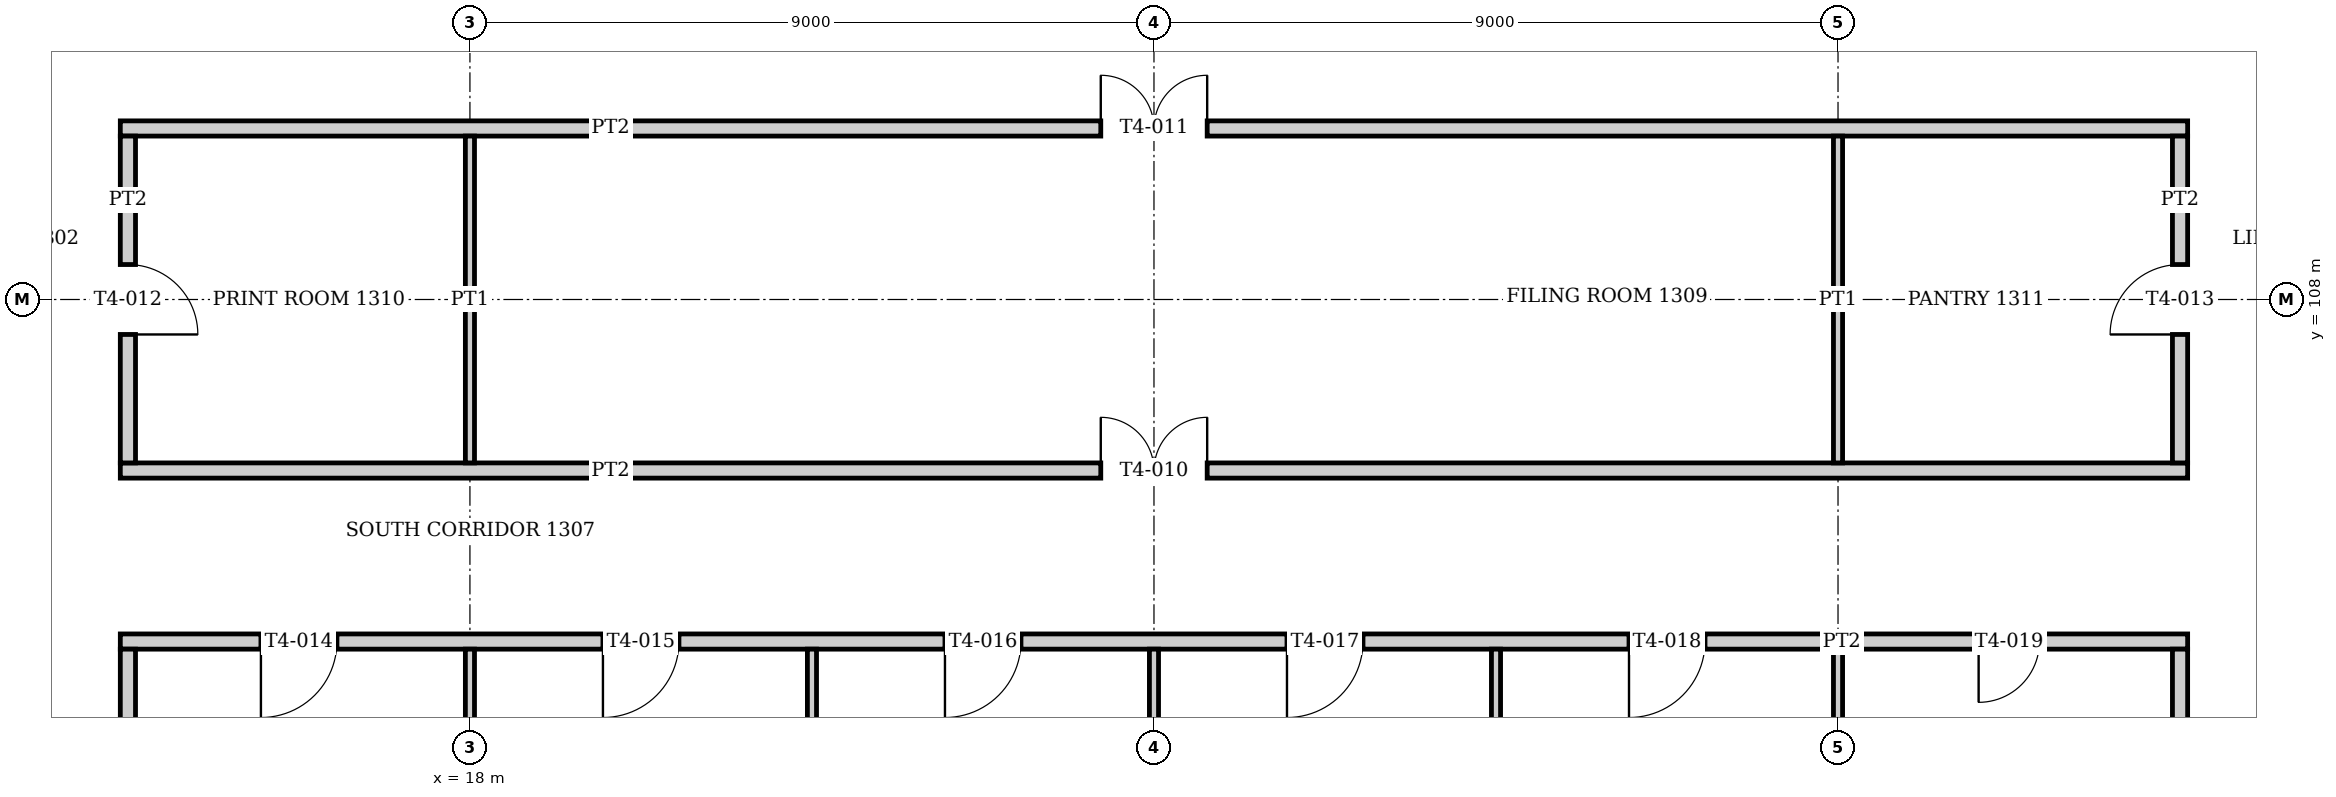
"""IFC4 building model, lengths in metres.
Left out: names, types, materials, properties, quantities, classifications, styles, units other than length and angle.
Written with IfcOpenShell. Run it as: python <this file> out.ifc"""

import sys

from ifc_helpers import new_model, si_unit, direction, frame, frame_2d, origin, place, context, subcontext, project, spatial, rectangle, extrude, element, fill, save


model = new_model("IFC4")
c1 = context("Model", 3, precision=1e-05, world=origin(), true_north=direction((0.0, 1.0)))
c2 = subcontext(c1, "Body", "Model", "MODEL_VIEW")
j1 = project(units=[si_unit("LENGTHUNIT", "METRE"), si_unit("PLANEANGLEUNIT", "RADIAN")], contexts=[c1])
p1 = place(None, origin())
s1 = spatial("IfcSite", under=j1, at=p1, CompositionType="ELEMENT")
p2 = place(p1, origin())
s2 = spatial("IfcBuilding", under=s1, at=p2, CompositionType="ELEMENT")
p3 = place(p2, frame((0.0, 0.0, 55.2)))
s3 = spatial("IfcBuildingStorey", under=s2, at=p3, CompositionType="ELEMENT", Elevation=55.2)
p4 = place(p3, frame((13.4, 103.5, 0.0), z_axis=(0.0, 0.0, 1.0), x_axis=(1.0, 0.0, 0.0)))
e1 = element("IfcWall", 1, at=p4, inside=s3, PredefinedType="PARTITIONING", context=c2, shape_type="SweptSolid", body=[
    extrude(rectangle(XDim=27.2, YDim=0.2, at=frame_2d((13.6, 0.0))), origin(), (0.0, 0.0, 1.0), 3.05),
])
p5 = place(p4, frame((1.85, 0.0, 0.0)))
e2 = element("IfcOpeningElement", 2, at=p5, cuts=e1, PredefinedType="OPENING", context=c2, shape_type="SweptSolid", body=[
    extrude(rectangle(XDim=1.0, YDim=2.1, at=frame_2d((0.5, 1.05))), frame((0.0, 0.11, 0.0), z_axis=(0.0, -1.0, 0.0), x_axis=(1.0, 0.0, 0.0)), (0.0, 0.0, 1.0), 0.22),
])
p6 = place(p4, frame((6.35, 0.0, 0.0)))
e3 = element("IfcOpeningElement", 3, at=p6, cuts=e1, PredefinedType="OPENING", context=c2, shape_type="SweptSolid", body=[
    extrude(rectangle(XDim=1.0, YDim=2.1, at=frame_2d((0.5, 1.05))), frame((0.0, 0.11, 0.0), z_axis=(0.0, -1.0, 0.0), x_axis=(1.0, 0.0, 0.0)), (0.0, 0.0, 1.0), 0.22),
])
p7 = place(p4, frame((10.85, 0.0, 0.0)))
e4 = element("IfcOpeningElement", 4, at=p7, cuts=e1, PredefinedType="OPENING", context=c2, shape_type="SweptSolid", body=[
    extrude(rectangle(XDim=1.0, YDim=2.1, at=frame_2d((0.5, 1.05))), frame((0.0, 0.11, 0.0), z_axis=(0.0, -1.0, 0.0), x_axis=(1.0, 0.0, 0.0)), (0.0, 0.0, 1.0), 0.22),
])
p8 = place(p4, frame((15.35, 0.0, 0.0)))
e5 = element("IfcOpeningElement", 5, at=p8, cuts=e1, PredefinedType="OPENING", context=c2, shape_type="SweptSolid", body=[
    extrude(rectangle(XDim=1.0, YDim=2.1, at=frame_2d((0.5, 1.05))), frame((0.0, 0.11, 0.0), z_axis=(0.0, -1.0, 0.0), x_axis=(1.0, 0.0, 0.0)), (0.0, 0.0, 1.0), 0.22),
])
p9 = place(p4, frame((19.85, 0.0, 0.0)))
e6 = element("IfcOpeningElement", 6, at=p9, cuts=e1, PredefinedType="OPENING", context=c2, shape_type="SweptSolid", body=[
    extrude(rectangle(XDim=1.0, YDim=2.1, at=frame_2d((0.5, 1.05))), frame((0.0, 0.11, 0.0), z_axis=(0.0, -1.0, 0.0), x_axis=(1.0, 0.0, 0.0)), (0.0, 0.0, 1.0), 0.22),
])
p10 = place(p4, frame((24.45, 0.0, 0.0)))
e7 = element("IfcOpeningElement", 7, at=p10, cuts=e1, PredefinedType="OPENING", context=c2, shape_type="SweptSolid", body=[
    extrude(rectangle(XDim=0.8, YDim=2.1, at=frame_2d((0.4, 1.05))), frame((0.0, 0.11, 0.0), z_axis=(0.0, -1.0, 0.0), x_axis=(1.0, 0.0, 0.0)), (0.0, 0.0, 1.0), 0.22),
])
p11 = place(p3, frame((13.4, 105.75, 0.0), z_axis=(0.0, 0.0, 1.0), x_axis=(1.0, 0.0, 0.0)))
e8 = element("IfcWall", 8, at=p11, inside=s3, PredefinedType="PARTITIONING", context=c2, shape_type="SweptSolid", body=[
    extrude(rectangle(XDim=27.2, YDim=0.2, at=frame_2d((13.6, 0.0))), origin(), (0.0, 0.0, 1.0), 3.05),
])
p12 = place(p11, frame((12.9, 0.0, 0.0)))
e9 = element("IfcOpeningElement", 9, at=p12, cuts=e8, PredefinedType="OPENING", context=c2, shape_type="SweptSolid", body=[
    extrude(rectangle(XDim=1.4, YDim=2.1, at=frame_2d((0.7, 1.05))), frame((0.0, 0.11, 0.0), z_axis=(0.0, -1.0, 0.0), x_axis=(1.0, 0.0, 0.0)), (0.0, 0.0, 1.0), 0.22),
])
p13 = place(p3, frame((13.4, 110.25, 0.0), z_axis=(0.0, 0.0, 1.0), x_axis=(1.0, 0.0, 0.0)))
e10 = element("IfcWall", 10, at=p13, inside=s3, PredefinedType="PARTITIONING", context=c2, shape_type="SweptSolid", body=[
    extrude(rectangle(XDim=27.2, YDim=0.2, at=frame_2d((13.6, 0.0))), origin(), (0.0, 0.0, 1.0), 3.05),
])
p14 = place(p13, frame((12.9, 0.0, 0.0)))
e11 = element("IfcOpeningElement", 11, at=p14, cuts=e10, PredefinedType="OPENING", context=c2, shape_type="SweptSolid", body=[
    extrude(rectangle(XDim=1.4, YDim=2.1, at=frame_2d((0.7, 1.05))), frame((0.0, 0.11, 0.0), z_axis=(0.0, -1.0, 0.0), x_axis=(1.0, 0.0, 0.0)), (0.0, 0.0, 1.0), 0.22),
])
p15 = place(p3, frame((13.5, 99.075, 0.0), z_axis=(0.0, 0.0, 1.0), x_axis=(0.0, 1.0, 0.0)))
e12 = element("IfcWall", 12, at=p15, inside=s3, PredefinedType="PARTITIONING", context=c2, shape_type="SweptSolid", body=[
    extrude(rectangle(XDim=4.325, YDim=0.2, at=frame_2d((2.163, 0.0))), origin(), (0.0, 0.0, 1.0), 3.05),
])
p16 = place(p3, frame((13.5, 105.85, 0.0), z_axis=(0.0, 0.0, 1.0), x_axis=(0.0, 1.0, 0.0)))
e13 = element("IfcWall", 13, at=p16, inside=s3, PredefinedType="PARTITIONING", context=c2, shape_type="SweptSolid", body=[
    extrude(rectangle(XDim=4.3, YDim=0.2, at=frame_2d((2.15, 0.0))), origin(), (0.0, 0.0, 1.0), 3.05),
])
p17 = place(p16, frame((1.69, 0.0, 0.0)))
e14 = element("IfcOpeningElement", 14, at=p17, cuts=e13, PredefinedType="OPENING", context=c2, shape_type="SweptSolid", body=[
    extrude(rectangle(XDim=0.92, YDim=2.1, at=frame_2d((0.46, 1.05))), frame((0.0, 0.11, 0.0), z_axis=(0.0, -1.0, 0.0), x_axis=(1.0, 0.0, 0.0)), (0.0, 0.0, 1.0), 0.22),
])
p18 = place(p3, frame((18.0, 99.164, 0.0), z_axis=(0.0, 0.0, 1.0), x_axis=(0.0, 1.0, 0.0)))
e15 = element("IfcWall", 15, at=p18, inside=s3, PredefinedType="PARTITIONING", context=c2, shape_type="SweptSolid", body=[
    extrude(rectangle(XDim=4.236, YDim=0.12, at=frame_2d((2.118, 0.0))), origin(), (0.0, 0.0, 1.0), 3.05),
])
p19 = place(p3, frame((18.0, 105.85, 0.0), z_axis=(0.0, 0.0, 1.0), x_axis=(0.0, 1.0, 0.0)))
e16 = element("IfcWall", 16, at=p19, inside=s3, PredefinedType="PARTITIONING", context=c2, shape_type="SweptSolid", body=[
    extrude(rectangle(XDim=4.3, YDim=0.12, at=frame_2d((2.15, 0.0))), origin(), (0.0, 0.0, 1.0), 3.05),
])
p20 = place(p3, frame((22.5, 99.075, 0.0), z_axis=(0.0, 0.0, 1.0), x_axis=(0.0, 1.0, 0.0)))
e17 = element("IfcWall", 17, at=p20, inside=s3, PredefinedType="PARTITIONING", context=c2, shape_type="SweptSolid", body=[
    extrude(rectangle(XDim=4.325, YDim=0.12, at=frame_2d((2.163, 0.0))), origin(), (0.0, 0.0, 1.0), 3.05),
])
p21 = place(p3, frame((27.0, 99.164, 0.0), z_axis=(0.0, 0.0, 1.0), x_axis=(0.0, 1.0, 0.0)))
e18 = element("IfcWall", 18, at=p21, inside=s3, PredefinedType="PARTITIONING", context=c2, shape_type="SweptSolid", body=[
    extrude(rectangle(XDim=4.236, YDim=0.12, at=frame_2d((2.118, 0.0))), origin(), (0.0, 0.0, 1.0), 3.05),
])
p22 = place(p3, frame((31.5, 99.075, 0.0), z_axis=(0.0, 0.0, 1.0), x_axis=(0.0, 1.0, 0.0)))
e19 = element("IfcWall", 19, at=p22, inside=s3, PredefinedType="PARTITIONING", context=c2, shape_type="SweptSolid", body=[
    extrude(rectangle(XDim=4.325, YDim=0.12, at=frame_2d((2.163, 0.0))), origin(), (0.0, 0.0, 1.0), 3.05),
])
p23 = place(p3, frame((36.0, 99.164, 0.0), z_axis=(0.0, 0.0, 1.0), x_axis=(0.0, 1.0, 0.0)))
e20 = element("IfcWall", 20, at=p23, inside=s3, PredefinedType="PARTITIONING", context=c2, shape_type="SweptSolid", body=[
    extrude(rectangle(XDim=4.236, YDim=0.12, at=frame_2d((2.118, 0.0))), origin(), (0.0, 0.0, 1.0), 3.05),
])
p24 = place(p3, frame((36.0, 105.85, 0.0), z_axis=(0.0, 0.0, 1.0), x_axis=(0.0, 1.0, 0.0)))
e21 = element("IfcWall", 21, at=p24, inside=s3, PredefinedType="PARTITIONING", context=c2, shape_type="SweptSolid", body=[
    extrude(rectangle(XDim=4.3, YDim=0.12, at=frame_2d((2.15, 0.0))), origin(), (0.0, 0.0, 1.0), 3.05),
])
p25 = place(p3, frame((40.5, 99.075, 0.0), z_axis=(0.0, 0.0, 1.0), x_axis=(0.0, 1.0, 0.0)))
e22 = element("IfcWall", 22, at=p25, inside=s3, PredefinedType="PARTITIONING", context=c2, shape_type="SweptSolid", body=[
    extrude(rectangle(XDim=4.325, YDim=0.2, at=frame_2d((2.163, 0.0))), origin(), (0.0, 0.0, 1.0), 3.05),
])
p26 = place(p3, frame((40.5, 105.85, 0.0), z_axis=(0.0, 0.0, 1.0), x_axis=(0.0, 1.0, 0.0)))
e23 = element("IfcWall", 23, at=p26, inside=s3, PredefinedType="PARTITIONING", context=c2, shape_type="SweptSolid", body=[
    extrude(rectangle(XDim=4.3, YDim=0.2, at=frame_2d((2.15, 0.0))), origin(), (0.0, 0.0, 1.0), 3.05),
])
p27 = place(p26, frame((1.69, 0.0, 0.0)))
e24 = element("IfcOpeningElement", 24, at=p27, cuts=e23, PredefinedType="OPENING", context=c2, shape_type="SweptSolid", body=[
    extrude(rectangle(XDim=0.92, YDim=2.1, at=frame_2d((0.46, 1.05))), frame((0.0, 0.11, 0.0), z_axis=(0.0, -1.0, 0.0), x_axis=(1.0, 0.0, 0.0)), (0.0, 0.0, 1.0), 0.22),
])
p28 = place(p12, origin())
e25 = element("IfcDoor", 25, at=p28, inside=s3, OperationType="DOUBLE_DOOR_SINGLE_SWING", PredefinedType="DOOR", context=c2, shape_type="SweptSolid", body=[
    extrude(rectangle(XDim=1.4, YDim=2.1, at=frame_2d((0.7, 1.05))), frame((0.0, 0.025, 0.0), z_axis=(0.0, -1.0, 0.0), x_axis=(1.0, 0.0, 0.0)), (0.0, 0.0, 1.0), 0.05),
])
fill(e9, e25)
p29 = place(p14, origin())
e26 = element("IfcDoor", 26, at=p29, inside=s3, OperationType="DOUBLE_DOOR_SINGLE_SWING", PredefinedType="DOOR", context=c2, shape_type="SweptSolid", body=[
    extrude(rectangle(XDim=1.4, YDim=2.1, at=frame_2d((0.7, 1.05))), frame((0.0, 0.025, 0.0), z_axis=(0.0, -1.0, 0.0), x_axis=(1.0, 0.0, 0.0)), (0.0, 0.0, 1.0), 0.05),
])
fill(e11, e26)
p30 = place(p17, frame((0.92, 0.0, 0.0), z_axis=(0.0, 0.0, 1.0), x_axis=(-1.0, 0.0, 0.0)))
e27 = element("IfcDoor", 27, at=p30, inside=s3, OperationType="SINGLE_SWING_RIGHT", PredefinedType="DOOR", context=c2, shape_type="SweptSolid", body=[
    extrude(rectangle(XDim=0.92, YDim=2.1, at=frame_2d((0.46, 1.05))), frame((0.0, 0.025, 0.0), z_axis=(0.0, -1.0, 0.0), x_axis=(1.0, 0.0, 0.0)), (0.0, 0.0, 1.0), 0.05),
])
fill(e14, e27)
p31 = place(p27, origin())
e28 = element("IfcDoor", 28, at=p31, inside=s3, OperationType="SINGLE_SWING_LEFT", PredefinedType="DOOR", context=c2, shape_type="SweptSolid", body=[
    extrude(rectangle(XDim=0.92, YDim=2.1, at=frame_2d((0.46, 1.05))), frame((0.0, 0.025, 0.0), z_axis=(0.0, -1.0, 0.0), x_axis=(1.0, 0.0, 0.0)), (0.0, 0.0, 1.0), 0.05),
])
fill(e24, e28)
p32 = place(p5, frame((1.0, 0.0, 0.0), z_axis=(0.0, 0.0, 1.0), x_axis=(-1.0, 0.0, 0.0)))
e29 = element("IfcDoor", 29, at=p32, inside=s3, OperationType="SINGLE_SWING_RIGHT", PredefinedType="DOOR", context=c2, shape_type="SweptSolid", body=[
    extrude(rectangle(XDim=1.0, YDim=2.1, at=frame_2d((0.5, 1.05))), frame((0.0, 0.025, 0.0), z_axis=(0.0, -1.0, 0.0), x_axis=(1.0, 0.0, 0.0)), (0.0, 0.0, 1.0), 0.05),
])
fill(e2, e29)
p33 = place(p6, frame((1.0, 0.0, 0.0), z_axis=(0.0, 0.0, 1.0), x_axis=(-1.0, 0.0, 0.0)))
e30 = element("IfcDoor", 30, at=p33, inside=s3, OperationType="SINGLE_SWING_RIGHT", PredefinedType="DOOR", context=c2, shape_type="SweptSolid", body=[
    extrude(rectangle(XDim=1.0, YDim=2.1, at=frame_2d((0.5, 1.05))), frame((0.0, 0.025, 0.0), z_axis=(0.0, -1.0, 0.0), x_axis=(1.0, 0.0, 0.0)), (0.0, 0.0, 1.0), 0.05),
])
fill(e3, e30)
p34 = place(p7, frame((1.0, 0.0, 0.0), z_axis=(0.0, 0.0, 1.0), x_axis=(-1.0, 0.0, 0.0)))
e31 = element("IfcDoor", 31, at=p34, inside=s3, OperationType="SINGLE_SWING_RIGHT", PredefinedType="DOOR", context=c2, shape_type="SweptSolid", body=[
    extrude(rectangle(XDim=1.0, YDim=2.1, at=frame_2d((0.5, 1.05))), frame((0.0, 0.025, 0.0), z_axis=(0.0, -1.0, 0.0), x_axis=(1.0, 0.0, 0.0)), (0.0, 0.0, 1.0), 0.05),
])
fill(e4, e31)
p35 = place(p8, frame((1.0, 0.0, 0.0), z_axis=(0.0, 0.0, 1.0), x_axis=(-1.0, 0.0, 0.0)))
e32 = element("IfcDoor", 32, at=p35, inside=s3, OperationType="SINGLE_SWING_RIGHT", PredefinedType="DOOR", context=c2, shape_type="SweptSolid", body=[
    extrude(rectangle(XDim=1.0, YDim=2.1, at=frame_2d((0.5, 1.05))), frame((0.0, 0.025, 0.0), z_axis=(0.0, -1.0, 0.0), x_axis=(1.0, 0.0, 0.0)), (0.0, 0.0, 1.0), 0.05),
])
fill(e5, e32)
p36 = place(p9, frame((1.0, 0.0, 0.0), z_axis=(0.0, 0.0, 1.0), x_axis=(-1.0, 0.0, 0.0)))
e33 = element("IfcDoor", 33, at=p36, inside=s3, OperationType="SINGLE_SWING_RIGHT", PredefinedType="DOOR", context=c2, shape_type="SweptSolid", body=[
    extrude(rectangle(XDim=1.0, YDim=2.1, at=frame_2d((0.5, 1.05))), frame((0.0, 0.025, 0.0), z_axis=(0.0, -1.0, 0.0), x_axis=(1.0, 0.0, 0.0)), (0.0, 0.0, 1.0), 0.05),
])
fill(e6, e33)
p37 = place(p10, frame((0.8, 0.0, 0.0), z_axis=(0.0, 0.0, 1.0), x_axis=(-1.0, 0.0, 0.0)))
e34 = element("IfcDoor", 34, at=p37, inside=s3, OperationType="SINGLE_SWING_RIGHT", PredefinedType="DOOR", context=c2, shape_type="SweptSolid", body=[
    extrude(rectangle(XDim=0.8, YDim=2.1, at=frame_2d((0.4, 1.05))), frame((0.0, 0.025, 0.0), z_axis=(0.0, -1.0, 0.0), x_axis=(1.0, 0.0, 0.0)), (0.0, 0.0, 1.0), 0.05),
])
fill(e7, e34)
save(model, sys.argv[1])
